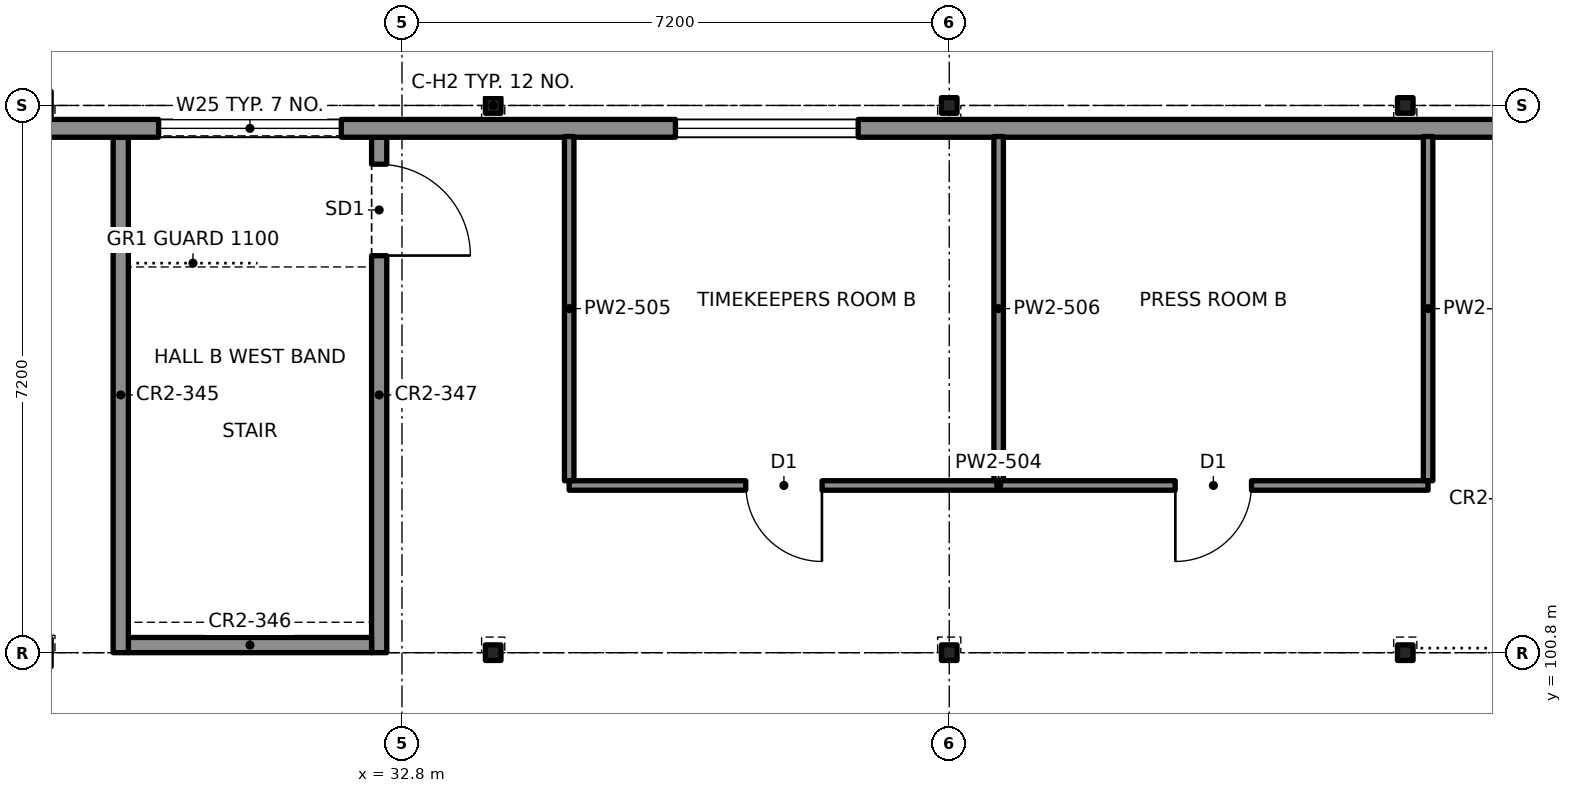
"""IFC4 building model, lengths in metres.
Left out: names, types, materials, properties, quantities, classifications, styles, units other than length and angle.
Written with IfcOpenShell. Run it as: python <this file> out.ifc"""

import sys

from ifc_helpers import new_model, si_unit, direction, frame, frame_2d, origin, origin_2d, place, context, subcontext, project, spatial, rectangle, i_section, extrude, element, fill, save


model = new_model("IFC4")
c1 = context("Model", 3, precision=1e-05, world=origin(), true_north=direction((0.0, 1.0)))
c2 = subcontext(c1, "Body", "Model", "MODEL_VIEW")
j1 = project(units=[si_unit("LENGTHUNIT", "METRE"), si_unit("PLANEANGLEUNIT", "RADIAN")], contexts=[c1])
p1 = place(None, origin())
s1 = spatial("IfcSite", under=j1, at=p1, CompositionType="ELEMENT")
p2 = place(p1, origin())
s2 = spatial("IfcBuilding", under=s1, at=p2, CompositionType="ELEMENT")
p3 = place(p2, frame((0.0, 0.0, 4.4)))
s3 = spatial("IfcBuildingStorey", under=s2, at=p3, CompositionType="ELEMENT", Elevation=4.4)
for number, where, z_axis, x_axis in (
    (1, (34.0, 100.8, 0.0), (0.0, 0.0, 1.0), (1.0, 0.0, 0.0)),
    (2, (34.0, 108.0, 0.0), (0.0, 0.0, 1.0), (1.0, 0.0, 0.0)),
    (3, (40.0, 100.8, 0.0), (0.0, 0.0, 1.0), (1.0, 0.0, 0.0)),
    (4, (40.0, 108.0, 0.0), (0.0, 0.0, 1.0), (1.0, 0.0, 0.0)),
    (5, (46.0, 100.8, 0.0), (0.0, 0.0, 1.0), (1.0, 0.0, 0.0)),
    (6, (46.0, 108.0, 0.0), (0.0, 0.0, 1.0), (1.0, 0.0, 0.0)),
):
    element("IfcColumn", number, at=place(p3, frame(where, z_axis=z_axis, x_axis=x_axis)), inside=s3, PredefinedType="COLUMN", context=c2, shape_type="SweptSolid", body=[
        extrude(i_section(OverallWidth=0.205, OverallDepth=0.31, WebThickness=0.01, FlangeThickness=0.016, at=origin_2d()), origin(), (0.0, 0.0, 1.0), 4.25),
    ])
p4 = place(p3, frame((26.8, 107.699, 0.0), z_axis=(0.0, 0.0, 1.0), x_axis=(1.0, 0.0, 0.0)))
e7 = element("IfcWall", 7, at=p4, inside=s3, PredefinedType="SOLIDWALL", context=c2, shape_type="SweptSolid", body=[
    extrude(rectangle(XDim=50.4, YDim=0.234, at=frame_2d((25.2, 0.0))), origin(), (0.0, 0.0, 1.0), 4.4),
])
p5 = place(p4, frame((2.8, 0.0, 1.0)))
e8 = element("IfcOpeningElement", 8, at=p5, cuts=e7, PredefinedType="OPENING", context=c2, shape_type="SweptSolid", body=[
    extrude(rectangle(XDim=2.4, YDim=2.4, at=frame_2d((1.2, 1.2))), frame((0.0, 0.127, 0.0), z_axis=(0.0, -1.0, 0.0), x_axis=(1.0, 0.0, 0.0)), (0.0, 0.0, 1.0), 0.254),
])
p6 = place(p4, frame((9.6, 0.0, 1.0)))
e9 = element("IfcOpeningElement", 9, at=p6, cuts=e7, PredefinedType="OPENING", context=c2, shape_type="SweptSolid", body=[
    extrude(rectangle(XDim=2.4, YDim=2.4, at=frame_2d((1.2, 1.2))), frame((0.0, 0.127, 0.0), z_axis=(0.0, -1.0, 0.0), x_axis=(1.0, 0.0, 0.0)), (0.0, 0.0, 1.0), 0.254),
])
p7 = place(p4, frame((21.6, 0.0, 1.0)))
e10 = element("IfcOpeningElement", 10, at=p7, cuts=e7, PredefinedType="OPENING", context=c2, shape_type="SweptSolid", body=[
    extrude(rectangle(XDim=2.4, YDim=2.4, at=frame_2d((1.2, 1.2))), frame((0.0, 0.127, 0.0), z_axis=(0.0, -1.0, 0.0), x_axis=(1.0, 0.0, 0.0)), (0.0, 0.0, 1.0), 0.254),
])
p8 = place(p4, frame((26.4, 0.0, 1.0)))
e11 = element("IfcOpeningElement", 11, at=p8, cuts=e7, PredefinedType="OPENING", context=c2, shape_type="SweptSolid", body=[
    extrude(rectangle(XDim=2.4, YDim=2.4, at=frame_2d((1.2, 1.2))), frame((0.0, 0.127, 0.0), z_axis=(0.0, -1.0, 0.0), x_axis=(1.0, 0.0, 0.0)), (0.0, 0.0, 1.0), 0.254),
])
p9 = place(p4, frame((38.4, 0.0, 1.0)))
e12 = element("IfcOpeningElement", 12, at=p9, cuts=e7, PredefinedType="OPENING", context=c2, shape_type="SweptSolid", body=[
    extrude(rectangle(XDim=2.4, YDim=2.4, at=frame_2d((1.2, 1.2))), frame((0.0, 0.127, 0.0), z_axis=(0.0, -1.0, 0.0), x_axis=(1.0, 0.0, 0.0)), (0.0, 0.0, 1.0), 0.254),
])
p10 = place(p4, frame((44.8, 0.0, 1.0)))
e13 = element("IfcOpeningElement", 13, at=p10, cuts=e7, PredefinedType="OPENING", context=c2, shape_type="SweptSolid", body=[
    extrude(rectangle(XDim=2.4, YDim=2.4, at=frame_2d((1.2, 1.2))), frame((0.0, 0.127, 0.0), z_axis=(0.0, -1.0, 0.0), x_axis=(1.0, 0.0, 0.0)), (0.0, 0.0, 1.0), 0.254),
])
p11 = place(p3, frame((29.1, 100.8, 0.0), z_axis=(0.0, 0.0, 1.0), x_axis=(0.0, 1.0, 0.0)))
e14 = element("IfcWall", 14, at=p11, inside=s3, PredefinedType="SOLIDWALL", context=c2, shape_type="SweptSolid", body=[
    extrude(rectangle(XDim=6.783, YDim=0.2, at=frame_2d((3.392, 0.0))), origin(), (0.0, 0.0, 1.0), 3.0),
])
p12 = place(p3, frame((32.5, 100.8, 0.0), z_axis=(0.0, 0.0, 1.0), x_axis=(0.0, 1.0, 0.0)))
e15 = element("IfcWall", 15, at=p12, inside=s3, PredefinedType="SOLIDWALL", context=c2, shape_type="SweptSolid", body=[
    extrude(rectangle(XDim=6.783, YDim=0.2, at=frame_2d((3.392, 0.0))), origin(), (0.0, 0.0, 1.0), 3.0),
])
p13 = place(p12, frame((5.225, 0.0, 0.0)))
e16 = element("IfcOpeningElement", 16, at=p13, cuts=e15, PredefinedType="OPENING", context=c2, shape_type="SweptSolid", body=[
    extrude(rectangle(XDim=1.2, YDim=2.1, at=frame_2d((0.6, 1.05))), frame((0.0, 0.11, 0.0), z_axis=(0.0, -1.0, 0.0), x_axis=(1.0, 0.0, 0.0)), (0.0, 0.0, 1.0), 0.22),
])
p14 = place(p3, frame((29.2, 100.9, 0.0), z_axis=(0.0, 0.0, 1.0), x_axis=(1.0, 0.0, 0.0)))
e17 = element("IfcWall", 17, at=p14, inside=s3, PredefinedType="SOLIDWALL", context=c2, shape_type="SweptSolid", body=[
    extrude(rectangle(XDim=3.2, YDim=0.2, at=frame_2d((1.6, 0.0))), origin(), (0.0, 0.0, 1.0), 3.0),
])
p15 = place(p3, frame((35.0, 103.0, 0.0), z_axis=(0.0, 0.0, 1.0), x_axis=(1.0, 0.0, 0.0)))
e18 = element("IfcWall", 18, at=p15, inside=s3, PredefinedType="PARTITIONING", context=c2, shape_type="SweptSolid", body=[
    extrude(rectangle(XDim=11.3, YDim=0.125, at=frame_2d((5.65, 0.0))), origin(), (0.0, 0.0, 1.0), 3.65),
])
p16 = place(p15, frame((2.325, 0.0, 0.0)))
e19 = element("IfcOpeningElement", 19, at=p16, cuts=e18, PredefinedType="OPENING", context=c2, shape_type="SweptSolid", body=[
    extrude(rectangle(XDim=1.0, YDim=2.1, at=frame_2d((0.5, 1.05))), frame((0.0, 0.073, 0.0), z_axis=(0.0, -1.0, 0.0), x_axis=(1.0, 0.0, 0.0)), (0.0, 0.0, 1.0), 0.145),
])
p17 = place(p15, frame((7.975, 0.0, 0.0)))
e20 = element("IfcOpeningElement", 20, at=p17, cuts=e18, PredefinedType="OPENING", context=c2, shape_type="SweptSolid", body=[
    extrude(rectangle(XDim=1.0, YDim=2.1, at=frame_2d((0.5, 1.05))), frame((0.0, 0.073, 0.0), z_axis=(0.0, -1.0, 0.0), x_axis=(1.0, 0.0, 0.0)), (0.0, 0.0, 1.0), 0.145),
])
for number, where, z_axis, x_axis in (
    (21, (35.0, 103.062, 0.0), (0.0, 0.0, 1.0), (0.0, 1.0, 0.0)),
    (22, (40.65, 103.062, 0.0), (0.0, 0.0, 1.0), (0.0, 1.0, 0.0)),
    (23, (46.3, 103.062, 0.0), (0.0, 0.0, 1.0), (0.0, 1.0, 0.0)),
):
    element("IfcWall", number, at=place(p3, frame(where, z_axis=z_axis, x_axis=x_axis)), inside=s3, PredefinedType="PARTITIONING", context=c2, shape_type="SweptSolid", body=[
        extrude(rectangle(XDim=4.529, YDim=0.125, at=frame_2d((2.265, 0.0))), origin(), (0.0, 0.0, 1.0), 3.65),
    ])
p18 = place(p5, origin())
e24 = element("IfcWindow", 24, at=p18, inside=s3, PartitioningType="SINGLE_PANEL", PredefinedType="WINDOW", context=c2, shape_type="SweptSolid", body=[
    extrude(rectangle(XDim=2.4, YDim=2.4, at=frame_2d((1.2, 1.2))), frame((0.0, 0.03, 0.0), z_axis=(0.0, -1.0, 0.0), x_axis=(1.0, 0.0, 0.0)), (0.0, 0.0, 1.0), 0.06),
])
fill(e8, e24)
p19 = place(p6, origin())
e25 = element("IfcWindow", 25, at=p19, inside=s3, PartitioningType="SINGLE_PANEL", PredefinedType="WINDOW", context=c2, shape_type="SweptSolid", body=[
    extrude(rectangle(XDim=2.4, YDim=2.4, at=frame_2d((1.2, 1.2))), frame((0.0, 0.03, 0.0), z_axis=(0.0, -1.0, 0.0), x_axis=(1.0, 0.0, 0.0)), (0.0, 0.0, 1.0), 0.06),
])
fill(e9, e25)
p20 = place(p13, origin())
e26 = element("IfcDoor", 26, at=p20, inside=s3, OperationType="SINGLE_SWING_LEFT", PredefinedType="DOOR", context=c2, shape_type="SweptSolid", body=[
    extrude(rectangle(XDim=1.2, YDim=2.1, at=frame_2d((0.6, 1.05))), frame((0.0, 0.025, 0.0), z_axis=(0.0, -1.0, 0.0), x_axis=(1.0, 0.0, 0.0)), (0.0, 0.0, 1.0), 0.05),
])
fill(e16, e26)
p21 = place(p16, origin())
e27 = element("IfcDoor", 27, at=p21, inside=s3, OperationType="SINGLE_SWING_RIGHT", PredefinedType="DOOR", context=c2, shape_type="SweptSolid", body=[
    extrude(rectangle(XDim=1.0, YDim=2.1, at=frame_2d((0.5, 1.05))), frame((0.0, 0.025, 0.0), z_axis=(0.0, -1.0, 0.0), x_axis=(1.0, 0.0, 0.0)), (0.0, 0.0, 1.0), 0.05),
])
fill(e19, e27)
p22 = place(p17, origin())
e28 = element("IfcDoor", 28, at=p22, inside=s3, OperationType="SINGLE_SWING_LEFT", PredefinedType="DOOR", context=c2, shape_type="SweptSolid", body=[
    extrude(rectangle(XDim=1.0, YDim=2.1, at=frame_2d((0.5, 1.05))), frame((0.0, 0.025, 0.0), z_axis=(0.0, -1.0, 0.0), x_axis=(1.0, 0.0, 0.0)), (0.0, 0.0, 1.0), 0.05),
])
fill(e20, e28)
save(model, sys.argv[1])
